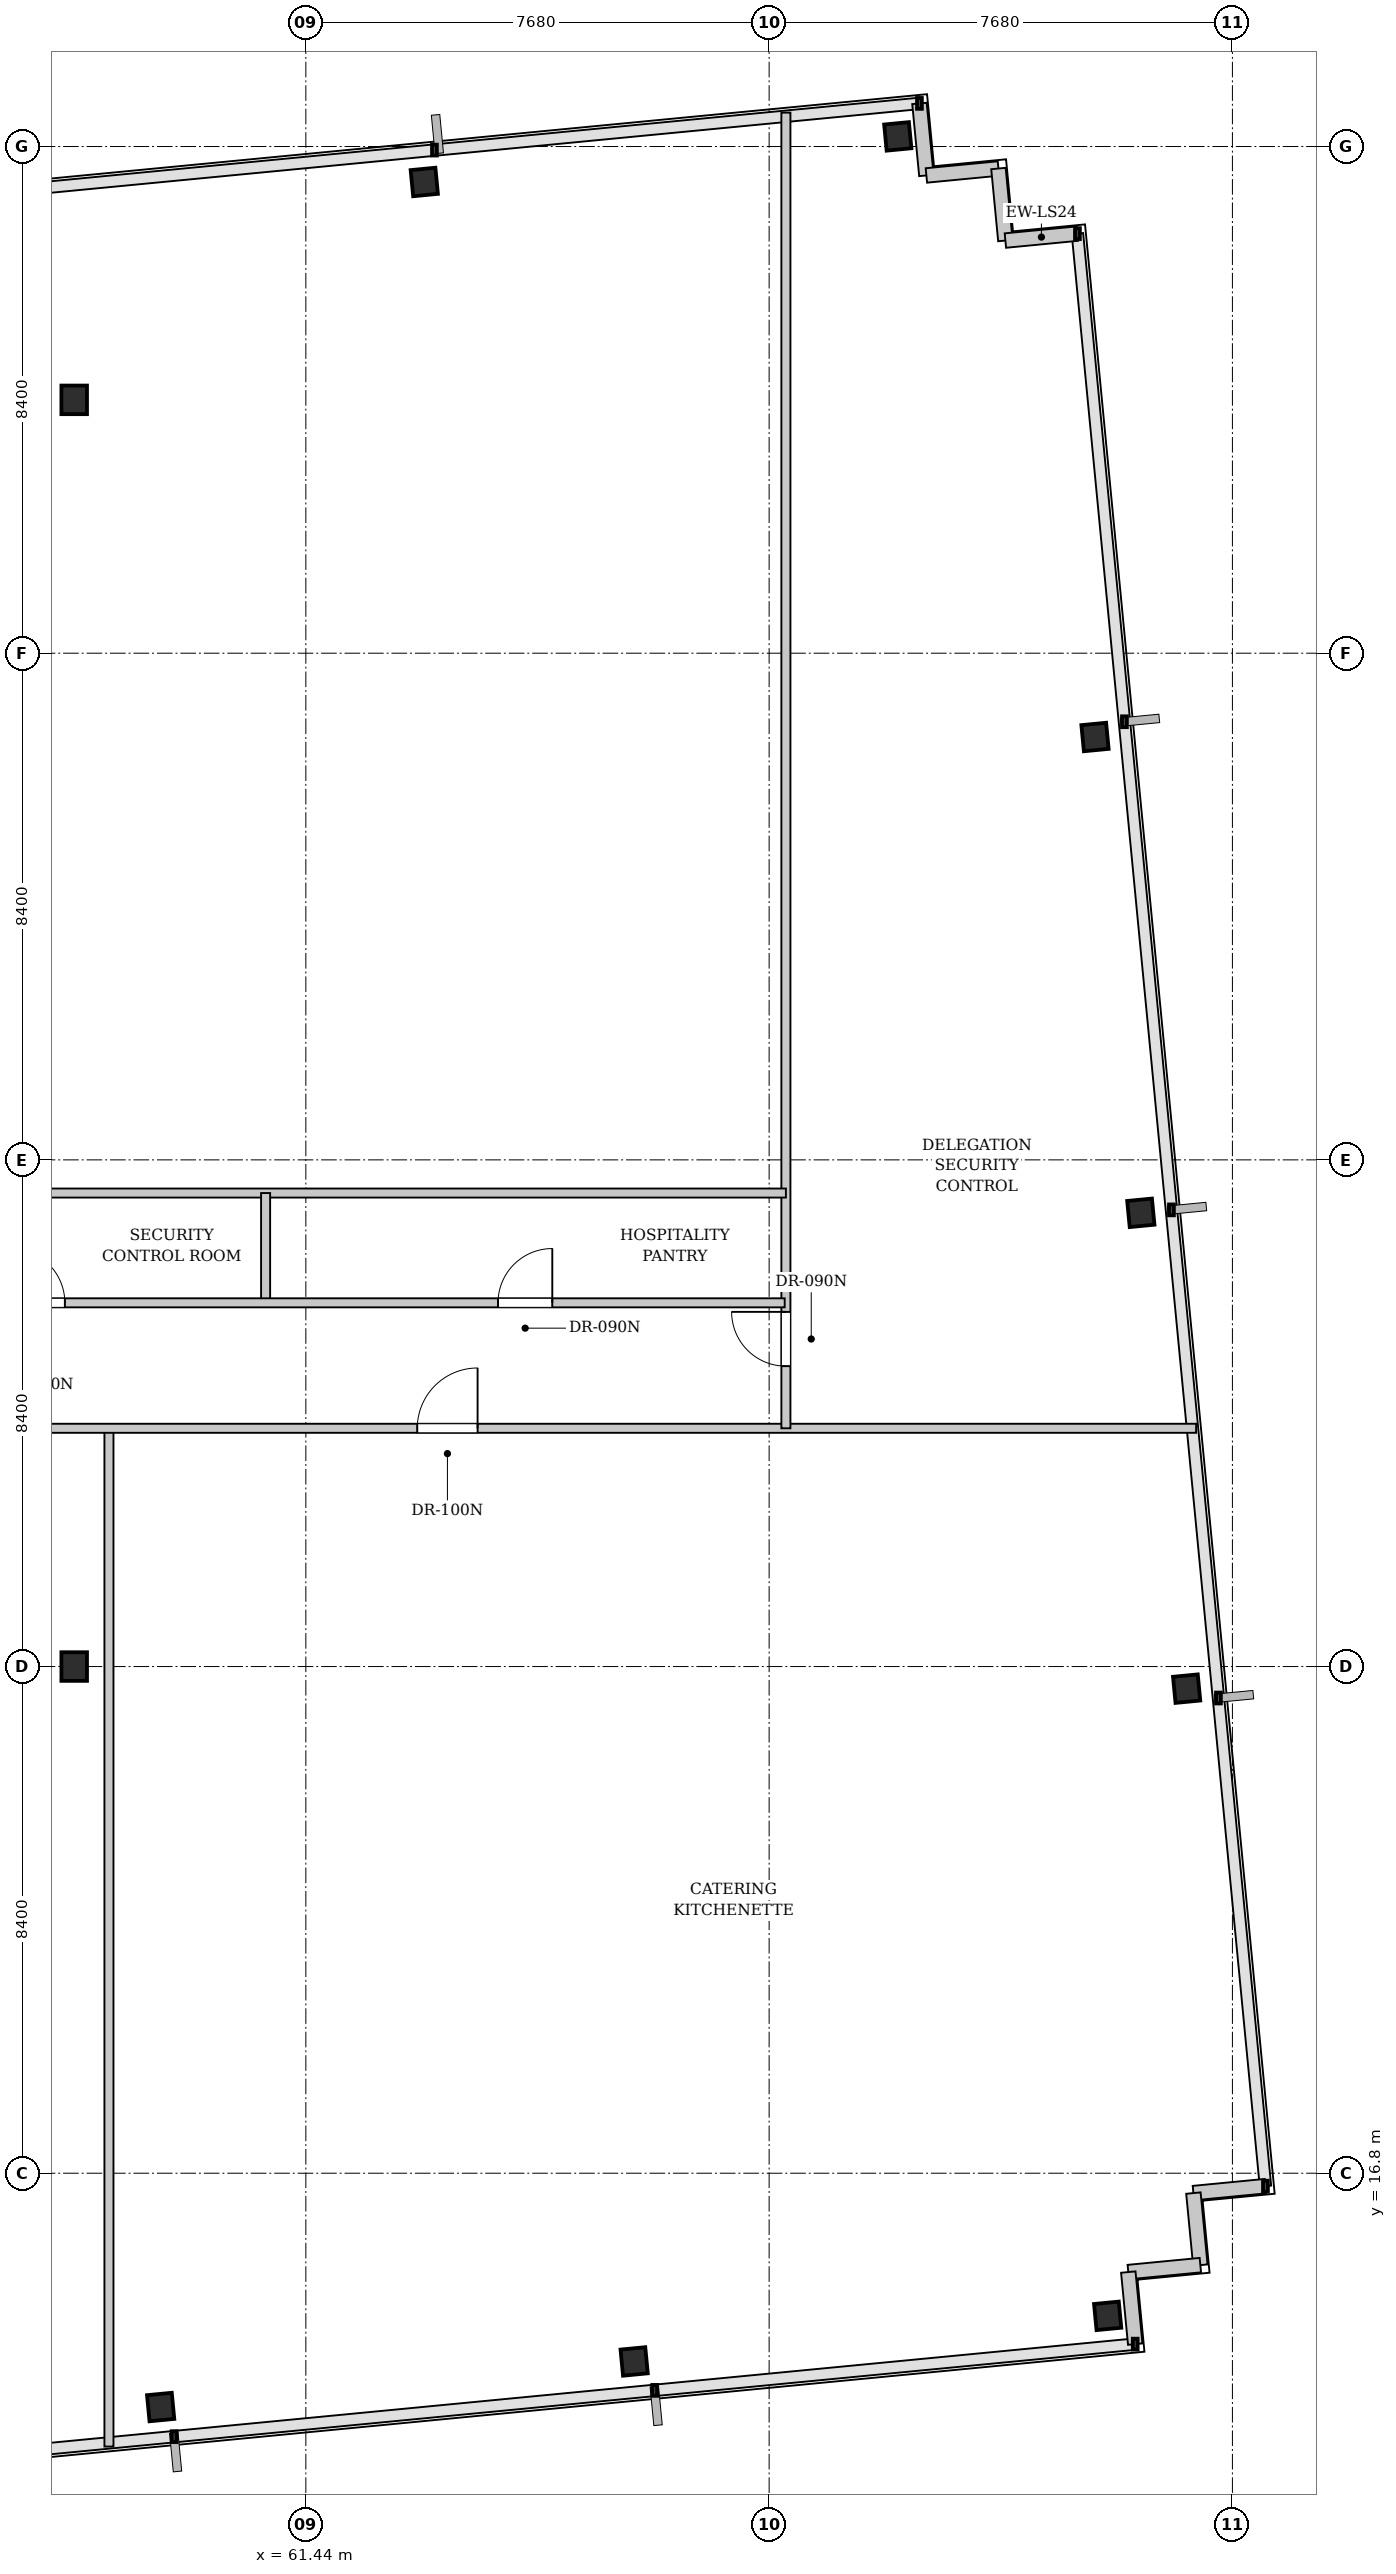
"""IFC4 building model, lengths in metres.
Left out: names, types, materials, properties, quantities, classifications, styles, units other than length and angle.
Written with IfcOpenShell. Run it as: python <this file> out.ifc"""

import sys

from ifc_helpers import new_model, si_unit, direction, frame, frame_2d, origin, origin_2d, place, context, subcontext, project, spatial, rectangle, i_section, extrude, element, fill, save


model = new_model("IFC4")
c1 = context("Model", 3, precision=1e-05, world=origin(), true_north=direction((0.0, 1.0)))
c2 = subcontext(c1, "Body", "Model", "MODEL_VIEW")
j1 = project(units=[si_unit("LENGTHUNIT", "METRE"), si_unit("PLANEANGLEUNIT", "RADIAN")], contexts=[c1])
p1 = place(None, origin())
s1 = spatial("IfcSite", under=j1, at=p1, CompositionType="ELEMENT")
p2 = place(p1, origin())
s2 = spatial("IfcBuilding", under=s1, at=p2, CompositionType="ELEMENT")
p3 = place(p2, frame((0.0, 0.0, 113.5)))
s3 = spatial("IfcBuildingStorey", under=s2, at=p3, CompositionType="ELEMENT", Elevation=113.5)
for number, where, z_axis, x_axis in (
    (1, (57.6, 25.2, 0.0), (0.0, 0.0, 1.0), (1.0, 0.0, 0.0)),
    (2, (57.6, 46.2, 0.0), (0.0, 0.0, 1.0), (1.0, 0.0, 0.0)),
):
    element("IfcColumn", number, at=place(p3, frame(where, z_axis=z_axis, x_axis=x_axis)), inside=s3, PredefinedType="COLUMN", context=c2, shape_type="SweptSolid", body=[
        extrude(i_section(OverallWidth=0.424, OverallDepth=0.474, WebThickness=0.047, FlangeThickness=0.077, FilletRadius=0.015, at=origin_2d()), origin(), (0.0, 0.0, 1.0), 3.4),
    ])
for number, where, z_axis, x_axis in (
    (3, (59.033, 12.923, 0.0), (0.0, 0.0, 1.0), (0.995, 0.096, 0.0)),
    (4, (66.883, 13.679, 0.0), (0.0, 0.0, 1.0), (0.995, 0.096, 0.0)),
    (5, (74.732, 14.435, 0.0), (0.0, 0.0, 1.0), (0.995, 0.096, 0.0)),
    (6, (63.403, 49.812, 0.0), (0.0, 0.0, 1.0), (0.995, 0.096, 0.0)),
    (7, (71.253, 50.568, 0.0), (0.0, 0.0, 1.0), (0.995, 0.096, 0.0)),
    (8, (76.041, 24.833, 0.0), (0.0, 0.0, 1.0), (0.995, 0.096, 0.0)),
    (9, (75.282, 32.722, 0.0), (0.0, 0.0, 1.0), (0.995, 0.096, 0.0)),
    (10, (74.522, 40.611, 0.0), (0.0, 0.0, 1.0), (0.995, 0.096, 0.0)),
):
    element("IfcColumn", number, at=place(p3, frame(where, z_axis=z_axis, x_axis=x_axis)), inside=s3, PredefinedType="COLUMN", context=c2, shape_type="SweptSolid", body=[
        extrude(i_section(OverallWidth=0.412, OverallDepth=0.435, WebThickness=0.036, FlangeThickness=0.058, FilletRadius=0.015, at=origin_2d()), origin(), (0.0, 0.0, 1.0), 3.4),
    ])
for number, where, z_axis, x_axis in (
    (11, (71.612, 51.115, 0.0), (0.0, 0.0, 1.0), (0.096, -0.995, 0.0)),
    (12, (71.727, 49.92, 0.0), (0.0, 0.0, 1.0), (0.995, 0.096, 0.0)),
    (13, (72.921, 50.035, 0.0), (0.0, 0.0, 1.0), (0.096, -0.995, 0.0)),
    (14, (73.036, 48.841, 0.0), (0.0, 0.0, 1.0), (0.995, 0.096, 0.0)),
):
    element("IfcWall", number, at=place(p3, frame(where, z_axis=z_axis, x_axis=x_axis)), inside=s3, PredefinedType="SOLIDWALL", context=c2, shape_type="SweptSolid", body=[
        extrude(rectangle(XDim=1.2, YDim=0.24, at=frame_2d((0.6, 0.0))), origin(), (0.0, 0.0, 1.0), 3.18),
    ])
p4 = place(p3, frame((77.348, 16.586, 0.0), z_axis=(0.0, 0.0, 1.0), x_axis=(-0.995397091755, -0.095836473879, 0.0)))
e15 = element("IfcWall", 15, at=p4, inside=s3, PredefinedType="SOLIDWALL", context=c2, shape_type="SweptSolid", body=[
    extrude(rectangle(XDim=1.2, YDim=0.24, at=frame_2d((0.6, 0.0))), origin(), (0.0, 0.0, 1.0), 3.18),
])
for number, where, z_axis, x_axis in (
    (16, (76.153, 16.471, 0.0), (0.0, 0.0, 1.0), (0.096, -0.995, 0.0)),
    (17, (76.268, 15.276, 0.0), (0.0, 0.0, 1.0), (-0.995, -0.096, 0.0)),
):
    element("IfcWall", number, at=place(p3, frame(where, z_axis=z_axis, x_axis=x_axis)), inside=s3, PredefinedType="SOLIDWALL", context=c2, shape_type="SweptSolid", body=[
        extrude(rectangle(XDim=1.2, YDim=0.24, at=frame_2d((0.6, 0.0))), origin(), (0.0, 0.0, 1.0), 3.18),
    ])
p5 = place(p3, frame((75.074, 15.161, 0.0), z_axis=(0.0, 0.0, 1.0), x_axis=(0.095836473879, -0.995397091755, 0.0)))
e18 = element("IfcWall", 18, at=p5, inside=s3, PredefinedType="SOLIDWALL", context=c2, shape_type="SweptSolid", body=[
    extrude(rectangle(XDim=1.2, YDim=0.24, at=frame_2d((0.6, 0.0))), origin(), (0.0, 0.0, 1.0), 3.18),
])
p6 = place(p3, frame((58.176, 12.268, 0.0), z_axis=(0.0, 0.0, 1.0), x_axis=(0.0, 1.0, 0.0)))
e19 = element("IfcWall", 19, at=p6, inside=s3, PredefinedType="PARTITIONING", context=c2, shape_type="SweptSolid", body=[
    extrude(rectangle(XDim=16.902, YDim=0.15, at=frame_2d((8.451, 0.0))), origin(), (0.0, 0.0, 1.0), 2.525),
])
p7 = place(p3, frame((14.976, 29.15, 0.0), z_axis=(0.0, 0.0, 1.0), x_axis=(1.0, 0.0, 0.0)))
e20 = element("IfcWall", 20, at=p7, inside=s3, PredefinedType="PARTITIONING", context=c2, shape_type="SweptSolid", body=[
    extrude(rectangle(XDim=61.222, YDim=0.15, at=frame_2d((30.611, 0.0))), origin(), (0.0, 0.0, 1.0), 2.525),
])
p8 = place(p7, frame((10.012, 0.0, 0.0)))
e21 = element("IfcOpeningElement", 21, at=p8, cuts=e20, PredefinedType="OPENING", context=c2, shape_type="SweptSolid", body=[
    extrude(rectangle(XDim=1.0, YDim=2.15, at=frame_2d((0.5, 1.075))), frame((0.0, 0.085, 0.0), z_axis=(0.0, -1.0, 0.0), x_axis=(1.0, 0.0, 0.0)), (0.0, 0.0, 1.0), 0.17),
])
p9 = place(p7, frame((23.954, 0.0, 0.0)))
e22 = element("IfcOpeningElement", 22, at=p9, cuts=e20, PredefinedType="OPENING", context=c2, shape_type="SweptSolid", body=[
    extrude(rectangle(XDim=1.0, YDim=2.15, at=frame_2d((0.5, 1.075))), frame((0.0, 0.085, 0.0), z_axis=(0.0, -1.0, 0.0), x_axis=(1.0, 0.0, 0.0)), (0.0, 0.0, 1.0), 0.17),
])
p10 = place(p7, frame((37.442, 0.0, 0.0)))
e23 = element("IfcOpeningElement", 23, at=p10, cuts=e20, PredefinedType="OPENING", context=c2, shape_type="SweptSolid", body=[
    extrude(rectangle(XDim=1.0, YDim=2.15, at=frame_2d((0.5, 1.075))), frame((0.0, 0.085, 0.0), z_axis=(0.0, -1.0, 0.0), x_axis=(1.0, 0.0, 0.0)), (0.0, 0.0, 1.0), 0.17),
])
p11 = place(p7, frame((48.311, 0.0, 0.0)))
e24 = element("IfcOpeningElement", 24, at=p11, cuts=e20, PredefinedType="OPENING", context=c2, shape_type="SweptSolid", body=[
    extrude(rectangle(XDim=1.0, YDim=2.15, at=frame_2d((0.5, 1.075))), frame((0.0, 0.085, 0.0), z_axis=(0.0, -1.0, 0.0), x_axis=(1.0, 0.0, 0.0)), (0.0, 0.0, 1.0), 0.17),
])
p12 = place(p3, frame((69.398, 29.15, 0.0), z_axis=(0.0, 0.0, 1.0), x_axis=(0.0, 1.0, 0.0)))
e25 = element("IfcWall", 25, at=p12, inside=s3, PredefinedType="PARTITIONING", context=c2, shape_type="SweptSolid", body=[
    extrude(rectangle(XDim=21.812, YDim=0.15, at=frame_2d((10.906, 0.0))), origin(), (0.0, 0.0, 1.0), 3.18),
])
p13 = place(p12, frame((1.03, 0.0, 0.0)))
e26 = element("IfcOpeningElement", 26, at=p13, cuts=e25, PredefinedType="OPENING", context=c2, shape_type="SweptSolid", body=[
    extrude(rectangle(XDim=0.9, YDim=2.15, at=frame_2d((0.45, 1.075))), frame((0.0, 0.085, 0.0), z_axis=(0.0, -1.0, 0.0), x_axis=(1.0, 0.0, 0.0)), (0.0, 0.0, 1.0), 0.17),
])
p14 = place(p3, frame((48.38, 33.05, 0.0), z_axis=(0.0, 0.0, 1.0), x_axis=(1.0, 0.0, 0.0)))
e27 = element("IfcWall", 27, at=p14, inside=s3, PredefinedType="PARTITIONING", context=c2, shape_type="SweptSolid", body=[
    extrude(rectangle(XDim=21.018, YDim=0.15, at=frame_2d((10.509, 0.0))), origin(), (0.0, 0.0, 1.0), 2.525),
])
p15 = place(p3, frame((60.773, 31.23, 0.0), z_axis=(0.0, 0.0, 1.0), x_axis=(0.0, 1.0, 0.0)))
e28 = element("IfcWall", 28, at=p15, inside=s3, PredefinedType="PARTITIONING", context=c2, shape_type="SweptSolid", body=[
    extrude(rectangle(XDim=1.82, YDim=0.15, at=frame_2d((0.91, 0.0))), origin(), (0.0, 0.0, 1.0), 3.18),
])
p16 = place(p3, frame((48.39, 31.23, 0.0), z_axis=(0.0, 0.0, 1.0), x_axis=(1.0, 0.0, 0.0)))
e29 = element("IfcWall", 29, at=p16, inside=s3, PredefinedType="PARTITIONING", context=c2, shape_type="SweptSolid", body=[
    extrude(rectangle(XDim=20.988, YDim=0.15, at=frame_2d((10.494, 0.0))), origin(), (0.0, 0.0, 1.0), 2.525),
])
p17 = place(p16, frame((1.963, 0.0, 0.0)))
e30 = element("IfcOpeningElement", 30, at=p17, cuts=e29, PredefinedType="OPENING", context=c2, shape_type="SweptSolid", body=[
    extrude(rectangle(XDim=0.9, YDim=2.15, at=frame_2d((0.45, 1.075))), frame((0.0, 0.085, 0.0), z_axis=(0.0, -1.0, 0.0), x_axis=(1.0, 0.0, 0.0)), (0.0, 0.0, 1.0), 0.17),
])
p18 = place(p16, frame((8.155, 0.0, 0.0)))
e31 = element("IfcOpeningElement", 31, at=p18, cuts=e29, PredefinedType="OPENING", context=c2, shape_type="SweptSolid", body=[
    extrude(rectangle(XDim=0.9, YDim=2.15, at=frame_2d((0.45, 1.075))), frame((0.0, 0.085, 0.0), z_axis=(0.0, -1.0, 0.0), x_axis=(1.0, 0.0, 0.0)), (0.0, 0.0, 1.0), 0.17),
])
p19 = place(p16, frame((16.236, 0.0, 0.0)))
e32 = element("IfcOpeningElement", 32, at=p19, cuts=e29, PredefinedType="OPENING", context=c2, shape_type="SweptSolid", body=[
    extrude(rectangle(XDim=0.9, YDim=2.15, at=frame_2d((0.45, 1.075))), frame((0.0, 0.085, 0.0), z_axis=(0.0, -1.0, 0.0), x_axis=(1.0, 0.0, 0.0)), (0.0, 0.0, 1.0), 0.17),
])
p20 = place(p11, origin())
e33 = element("IfcDoor", 33, at=p20, inside=s3, OperationType="SINGLE_SWING_RIGHT", PredefinedType="DOOR", context=c2, shape_type="SweptSolid", body=[
    extrude(rectangle(XDim=1.0, YDim=2.15, at=frame_2d((0.5, 1.075))), frame((0.0, 0.025, 0.0), z_axis=(0.0, -1.0, 0.0), x_axis=(1.0, 0.0, 0.0)), (0.0, 0.0, 1.0), 0.05),
])
fill(e24, e33)
p21 = place(p13, origin())
e34 = element("IfcDoor", 34, at=p21, inside=s3, OperationType="SINGLE_SWING_RIGHT", PredefinedType="DOOR", context=c2, shape_type="SweptSolid", body=[
    extrude(rectangle(XDim=0.9, YDim=2.15, at=frame_2d((0.45, 1.075))), frame((0.0, 0.025, 0.0), z_axis=(0.0, -1.0, 0.0), x_axis=(1.0, 0.0, 0.0)), (0.0, 0.0, 1.0), 0.05),
])
fill(e26, e34)
p22 = place(p18, origin())
e35 = element("IfcDoor", 35, at=p22, inside=s3, OperationType="SINGLE_SWING_LEFT", PredefinedType="DOOR", context=c2, shape_type="SweptSolid", body=[
    extrude(rectangle(XDim=0.9, YDim=2.15, at=frame_2d((0.45, 1.075))), frame((0.0, 0.025, 0.0), z_axis=(0.0, -1.0, 0.0), x_axis=(1.0, 0.0, 0.0)), (0.0, 0.0, 1.0), 0.05),
])
fill(e31, e35)
p23 = place(p19, origin())
e36 = element("IfcDoor", 36, at=p23, inside=s3, OperationType="SINGLE_SWING_RIGHT", PredefinedType="DOOR", context=c2, shape_type="SweptSolid", body=[
    extrude(rectangle(XDim=0.9, YDim=2.15, at=frame_2d((0.45, 1.075))), frame((0.0, 0.025, 0.0), z_axis=(0.0, -1.0, 0.0), x_axis=(1.0, 0.0, 0.0)), (0.0, 0.0, 1.0), 0.05),
])
fill(e32, e36)
save(model, sys.argv[1])
